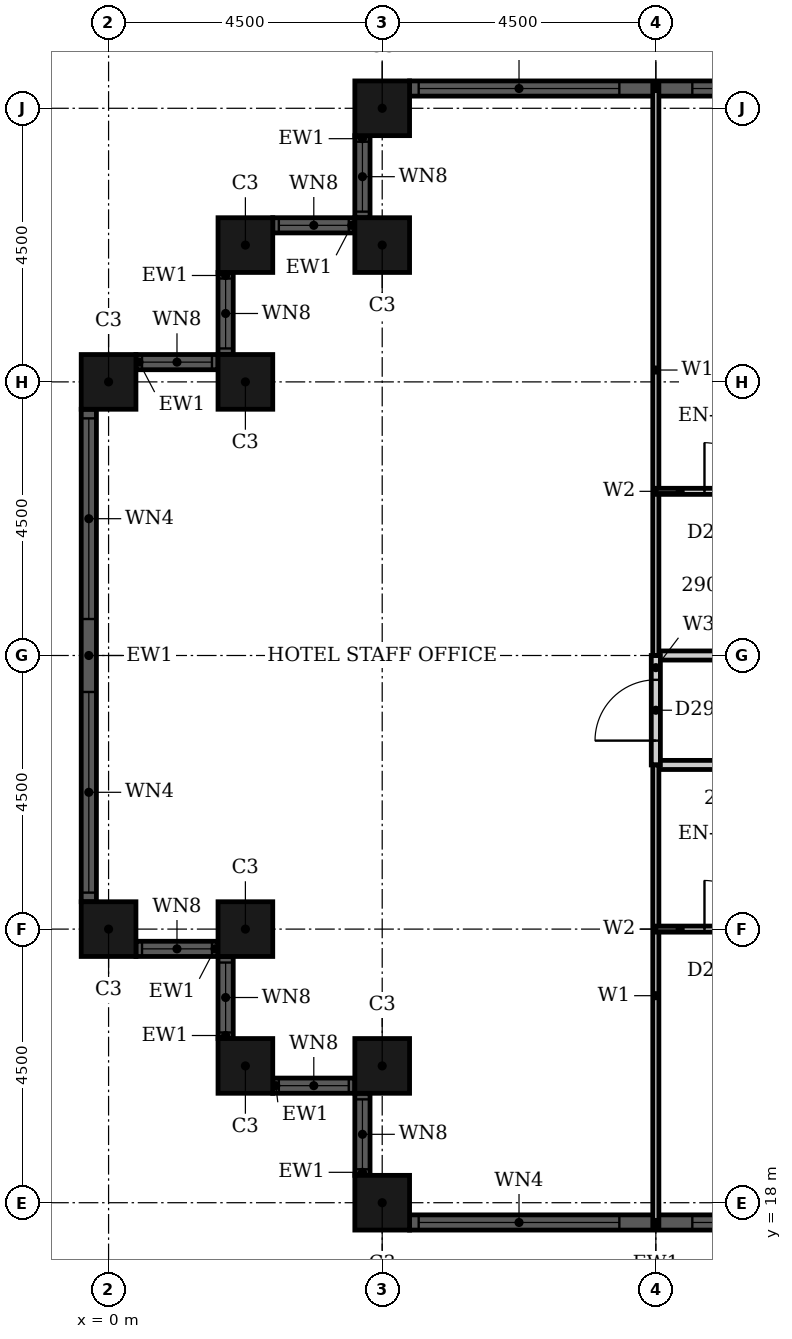
"""IFC4 building model, lengths in metres.
Left out: names, types, materials, properties, quantities, classifications, styles, units other than length and angle.
Written with IfcOpenShell. Run it as: python <this file> out.ifc"""

import sys

from ifc_helpers import new_model, si_unit, direction, frame, frame_2d, origin, origin_2d, place, context, subcontext, project, spatial, rectangle, hollow_rectangle, extrude, element, fill, save


model = new_model("IFC4")
c1 = context("Model", 3, precision=1e-05, world=origin(), true_north=direction((0.0, 1.0)))
c2 = subcontext(c1, "Body", "Model", "MODEL_VIEW")
j1 = project(units=[si_unit("LENGTHUNIT", "METRE"), si_unit("PLANEANGLEUNIT", "RADIAN")], contexts=[c1])
p1 = place(None, origin())
s1 = spatial("IfcSite", under=j1, at=p1, CompositionType="ELEMENT")
p2 = place(p1, origin())
s2 = spatial("IfcBuilding", under=s1, at=p2, CompositionType="ELEMENT")
p3 = place(p2, frame((0.0, 0.0, 118.8)))
s3 = spatial("IfcBuildingStorey", under=s2, at=p3, CompositionType="ELEMENT", Elevation=118.8)
for number, where, z_axis, x_axis in (
    (1, (4.5, 36.0, 0.0), (0.0, 0.0, 1.0), (1.0, 0.0, 0.0)),
    (2, (4.5, 33.75, 0.0), (0.0, 0.0, 1.0), (1.0, 0.0, 0.0)),
    (3, (2.25, 33.75, 0.0), (0.0, 0.0, 1.0), (1.0, 0.0, 0.0)),
    (4, (2.25, 31.5, 0.0), (0.0, 0.0, 1.0), (1.0, 0.0, 0.0)),
    (5, (0.0, 31.5, 0.0), (0.0, 0.0, 1.0), (1.0, 0.0, 0.0)),
    (6, (0.0, 22.5, 0.0), (0.0, 0.0, 1.0), (1.0, 0.0, 0.0)),
    (7, (2.25, 22.5, 0.0), (0.0, 0.0, 1.0), (1.0, 0.0, 0.0)),
    (8, (2.25, 20.25, 0.0), (0.0, 0.0, 1.0), (1.0, 0.0, 0.0)),
    (9, (4.5, 20.25, 0.0), (0.0, 0.0, 1.0), (1.0, 0.0, 0.0)),
    (10, (4.5, 18.0, 0.0), (0.0, 0.0, 1.0), (1.0, 0.0, 0.0)),
):
    element("IfcColumn", number, at=place(p3, frame(where, z_axis=z_axis, x_axis=x_axis)), inside=s3, PredefinedType="COLUMN", context=c2, shape_type="SweptSolid", body=[
        extrude(hollow_rectangle(XDim=0.9, YDim=0.9, WallThickness=0.028, at=origin_2d()), origin(), (0.0, 0.0, 1.0), 3.6),
    ])
p4 = place(p3, frame((13.05, 36.325, 0.0), z_axis=(0.0, 0.0, 1.0), x_axis=(-1.0, 0.0, 0.0)))
e11 = element("IfcWall", 11, at=p4, inside=s3, PredefinedType="SOLIDWALL", context=c2, shape_type="SweptSolid", body=[
    extrude(rectangle(XDim=8.1, YDim=0.25, at=frame_2d((4.05, 0.0))), origin(), (0.0, 0.0, 1.0), 3.6),
])
p5 = place(p4, frame((0.15, 0.0, 0.9)))
e12 = element("IfcOpeningElement", 12, at=p5, cuts=e11, PredefinedType="OPENING", context=c2, shape_type="SweptSolid", body=[
    extrude(rectangle(XDim=3.3, YDim=2.08, at=frame_2d((1.65, 1.04))), frame((0.0, 0.135, 0.0), z_axis=(0.0, -1.0, 0.0), x_axis=(1.0, 0.0, 0.0)), (0.0, 0.0, 1.0), 0.27),
])
p6 = place(p4, frame((4.65, 0.0, 0.9)))
e13 = element("IfcOpeningElement", 13, at=p6, cuts=e11, PredefinedType="OPENING", context=c2, shape_type="SweptSolid", body=[
    extrude(rectangle(XDim=3.3, YDim=2.08, at=frame_2d((1.65, 1.04))), frame((0.0, 0.135, 0.0), z_axis=(0.0, -1.0, 0.0), x_axis=(1.0, 0.0, 0.0)), (0.0, 0.0, 1.0), 0.27),
])
p7 = place(p3, frame((4.175, 35.55, 0.0), z_axis=(0.0, 0.0, 1.0), x_axis=(0.0, -1.0, 0.0)))
e14 = element("IfcWall", 14, at=p7, inside=s3, PredefinedType="SOLIDWALL", context=c2, shape_type="SweptSolid", body=[
    extrude(rectangle(XDim=1.35, YDim=0.25, at=frame_2d((0.675, 0.0))), origin(), (0.0, 0.0, 1.0), 3.6),
])
p8 = place(p7, frame((0.1, 0.0, 0.9)))
e15 = element("IfcOpeningElement", 15, at=p8, cuts=e14, PredefinedType="OPENING", context=c2, shape_type="SweptSolid", body=[
    extrude(rectangle(XDim=1.15, YDim=2.08, at=frame_2d((0.575, 1.04))), frame((0.0, 0.135, 0.0), z_axis=(0.0, -1.0, 0.0), x_axis=(1.0, 0.0, 0.0)), (0.0, 0.0, 1.0), 0.27),
])
p9 = place(p3, frame((4.05, 34.075, 0.0), z_axis=(0.0, 0.0, 1.0), x_axis=(-1.0, 0.0, 0.0)))
e16 = element("IfcWall", 16, at=p9, inside=s3, PredefinedType="SOLIDWALL", context=c2, shape_type="SweptSolid", body=[
    extrude(rectangle(XDim=1.35, YDim=0.25, at=frame_2d((0.675, 0.0))), origin(), (0.0, 0.0, 1.0), 3.6),
])
p10 = place(p9, frame((0.1, 0.0, 0.9)))
e17 = element("IfcOpeningElement", 17, at=p10, cuts=e16, PredefinedType="OPENING", context=c2, shape_type="SweptSolid", body=[
    extrude(rectangle(XDim=1.15, YDim=2.08, at=frame_2d((0.575, 1.04))), frame((0.0, 0.135, 0.0), z_axis=(0.0, -1.0, 0.0), x_axis=(1.0, 0.0, 0.0)), (0.0, 0.0, 1.0), 0.27),
])
p11 = place(p3, frame((1.925, 33.3, 0.0), z_axis=(0.0, 0.0, 1.0), x_axis=(0.0, -1.0, 0.0)))
e18 = element("IfcWall", 18, at=p11, inside=s3, PredefinedType="SOLIDWALL", context=c2, shape_type="SweptSolid", body=[
    extrude(rectangle(XDim=1.35, YDim=0.25, at=frame_2d((0.675, 0.0))), origin(), (0.0, 0.0, 1.0), 3.6),
])
p12 = place(p11, frame((0.1, 0.0, 0.9)))
e19 = element("IfcOpeningElement", 19, at=p12, cuts=e18, PredefinedType="OPENING", context=c2, shape_type="SweptSolid", body=[
    extrude(rectangle(XDim=1.15, YDim=2.08, at=frame_2d((0.575, 1.04))), frame((0.0, 0.135, 0.0), z_axis=(0.0, -1.0, 0.0), x_axis=(1.0, 0.0, 0.0)), (0.0, 0.0, 1.0), 0.27),
])
p13 = place(p3, frame((1.8, 31.825, 0.0), z_axis=(0.0, 0.0, 1.0), x_axis=(-1.0, 0.0, 0.0)))
e20 = element("IfcWall", 20, at=p13, inside=s3, PredefinedType="SOLIDWALL", context=c2, shape_type="SweptSolid", body=[
    extrude(rectangle(XDim=1.35, YDim=0.25, at=frame_2d((0.675, 0.0))), origin(), (0.0, 0.0, 1.0), 3.6),
])
p14 = place(p13, frame((0.1, 0.0, 0.9)))
e21 = element("IfcOpeningElement", 21, at=p14, cuts=e20, PredefinedType="OPENING", context=c2, shape_type="SweptSolid", body=[
    extrude(rectangle(XDim=1.15, YDim=2.08, at=frame_2d((0.575, 1.04))), frame((0.0, 0.135, 0.0), z_axis=(0.0, -1.0, 0.0), x_axis=(1.0, 0.0, 0.0)), (0.0, 0.0, 1.0), 0.27),
])
p15 = place(p3, frame((-0.325, 31.05, 0.0), z_axis=(0.0, 0.0, 1.0), x_axis=(0.0, -1.0, 0.0)))
e22 = element("IfcWall", 22, at=p15, inside=s3, PredefinedType="SOLIDWALL", context=c2, shape_type="SweptSolid", body=[
    extrude(rectangle(XDim=8.1, YDim=0.25, at=frame_2d((4.05, 0.0))), origin(), (0.0, 0.0, 1.0), 3.6),
])
p16 = place(p15, frame((0.15, 0.0, 0.9)))
e23 = element("IfcOpeningElement", 23, at=p16, cuts=e22, PredefinedType="OPENING", context=c2, shape_type="SweptSolid", body=[
    extrude(rectangle(XDim=3.3, YDim=2.08, at=frame_2d((1.65, 1.04))), frame((0.0, 0.135, 0.0), z_axis=(0.0, -1.0, 0.0), x_axis=(1.0, 0.0, 0.0)), (0.0, 0.0, 1.0), 0.27),
])
p17 = place(p15, frame((4.65, 0.0, 0.9)))
e24 = element("IfcOpeningElement", 24, at=p17, cuts=e22, PredefinedType="OPENING", context=c2, shape_type="SweptSolid", body=[
    extrude(rectangle(XDim=3.3, YDim=2.08, at=frame_2d((1.65, 1.04))), frame((0.0, 0.135, 0.0), z_axis=(0.0, -1.0, 0.0), x_axis=(1.0, 0.0, 0.0)), (0.0, 0.0, 1.0), 0.27),
])
p18 = place(p3, frame((0.45, 22.175, 0.0), z_axis=(0.0, 0.0, 1.0), x_axis=(1.0, 0.0, 0.0)))
e25 = element("IfcWall", 25, at=p18, inside=s3, PredefinedType="SOLIDWALL", context=c2, shape_type="SweptSolid", body=[
    extrude(rectangle(XDim=1.35, YDim=0.25, at=frame_2d((0.675, 0.0))), origin(), (0.0, 0.0, 1.0), 3.6),
])
p19 = place(p18, frame((0.1, 0.0, 0.9)))
e26 = element("IfcOpeningElement", 26, at=p19, cuts=e25, PredefinedType="OPENING", context=c2, shape_type="SweptSolid", body=[
    extrude(rectangle(XDim=1.15, YDim=2.08, at=frame_2d((0.575, 1.04))), frame((0.0, 0.135, 0.0), z_axis=(0.0, -1.0, 0.0), x_axis=(1.0, 0.0, 0.0)), (0.0, 0.0, 1.0), 0.27),
])
p20 = place(p3, frame((1.925, 22.05, 0.0), z_axis=(0.0, 0.0, 1.0), x_axis=(0.0, -1.0, 0.0)))
e27 = element("IfcWall", 27, at=p20, inside=s3, PredefinedType="SOLIDWALL", context=c2, shape_type="SweptSolid", body=[
    extrude(rectangle(XDim=1.35, YDim=0.25, at=frame_2d((0.675, 0.0))), origin(), (0.0, 0.0, 1.0), 3.6),
])
p21 = place(p20, frame((0.1, 0.0, 0.9)))
e28 = element("IfcOpeningElement", 28, at=p21, cuts=e27, PredefinedType="OPENING", context=c2, shape_type="SweptSolid", body=[
    extrude(rectangle(XDim=1.15, YDim=2.08, at=frame_2d((0.575, 1.04))), frame((0.0, 0.135, 0.0), z_axis=(0.0, -1.0, 0.0), x_axis=(1.0, 0.0, 0.0)), (0.0, 0.0, 1.0), 0.27),
])
p22 = place(p3, frame((2.7, 19.925, 0.0), z_axis=(0.0, 0.0, 1.0), x_axis=(1.0, 0.0, 0.0)))
e29 = element("IfcWall", 29, at=p22, inside=s3, PredefinedType="SOLIDWALL", context=c2, shape_type="SweptSolid", body=[
    extrude(rectangle(XDim=1.35, YDim=0.25, at=frame_2d((0.675, 0.0))), origin(), (0.0, 0.0, 1.0), 3.6),
])
p23 = place(p22, frame((0.1, 0.0, 0.9)))
e30 = element("IfcOpeningElement", 30, at=p23, cuts=e29, PredefinedType="OPENING", context=c2, shape_type="SweptSolid", body=[
    extrude(rectangle(XDim=1.15, YDim=2.08, at=frame_2d((0.575, 1.04))), frame((0.0, 0.135, 0.0), z_axis=(0.0, -1.0, 0.0), x_axis=(1.0, 0.0, 0.0)), (0.0, 0.0, 1.0), 0.27),
])
p24 = place(p3, frame((4.175, 19.8, 0.0), z_axis=(0.0, 0.0, 1.0), x_axis=(0.0, -1.0, 0.0)))
e31 = element("IfcWall", 31, at=p24, inside=s3, PredefinedType="SOLIDWALL", context=c2, shape_type="SweptSolid", body=[
    extrude(rectangle(XDim=1.35, YDim=0.25, at=frame_2d((0.675, 0.0))), origin(), (0.0, 0.0, 1.0), 3.6),
])
p25 = place(p24, frame((0.1, 0.0, 0.9)))
e32 = element("IfcOpeningElement", 32, at=p25, cuts=e31, PredefinedType="OPENING", context=c2, shape_type="SweptSolid", body=[
    extrude(rectangle(XDim=1.15, YDim=2.08, at=frame_2d((0.575, 1.04))), frame((0.0, 0.135, 0.0), z_axis=(0.0, -1.0, 0.0), x_axis=(1.0, 0.0, 0.0)), (0.0, 0.0, 1.0), 0.27),
])
p26 = place(p3, frame((4.95, 17.675, 0.0), z_axis=(0.0, 0.0, 1.0), x_axis=(1.0, 0.0, 0.0)))
e33 = element("IfcWall", 33, at=p26, inside=s3, PredefinedType="SOLIDWALL", context=c2, shape_type="SweptSolid", body=[
    extrude(rectangle(XDim=8.1, YDim=0.25, at=frame_2d((4.05, 0.0))), origin(), (0.0, 0.0, 1.0), 3.6),
])
p27 = place(p26, frame((0.15, 0.0, 0.9)))
e34 = element("IfcOpeningElement", 34, at=p27, cuts=e33, PredefinedType="OPENING", context=c2, shape_type="SweptSolid", body=[
    extrude(rectangle(XDim=3.3, YDim=2.08, at=frame_2d((1.65, 1.04))), frame((0.0, 0.135, 0.0), z_axis=(0.0, -1.0, 0.0), x_axis=(1.0, 0.0, 0.0)), (0.0, 0.0, 1.0), 0.27),
])
p28 = place(p26, frame((4.65, 0.0, 0.9)))
e35 = element("IfcOpeningElement", 35, at=p28, cuts=e33, PredefinedType="OPENING", context=c2, shape_type="SweptSolid", body=[
    extrude(rectangle(XDim=3.3, YDim=2.08, at=frame_2d((1.65, 1.04))), frame((0.0, 0.135, 0.0), z_axis=(0.0, -1.0, 0.0), x_axis=(1.0, 0.0, 0.0)), (0.0, 0.0, 1.0), 0.27),
])
p29 = place(p3, frame((9.0, 25.2, 0.0), z_axis=(0.0, 0.0, 1.0), x_axis=(1.0, 0.0, 0.0)))
e36 = element("IfcWall", 36, at=p29, inside=s3, PredefinedType="PARTITIONING", context=c2, shape_type="SweptSolid", body=[
    extrude(rectangle(XDim=7.2, YDim=0.15, at=frame_2d((3.6, 0.0))), origin(), (0.0, 0.0, 1.0), 3.3),
])
p30 = place(p29, frame((2.95, 0.0, 0.0)))
e37 = element("IfcOpeningElement", 37, at=p30, cuts=e36, PredefinedType="OPENING", context=c2, shape_type="SweptSolid", body=[
    extrude(rectangle(XDim=1.0, YDim=2.1, at=frame_2d((0.5, 1.05))), frame((0.0, 0.085, 0.0), z_axis=(0.0, -1.0, 0.0), x_axis=(1.0, 0.0, 0.0)), (0.0, 0.0, 1.0), 0.17),
])
p31 = place(p3, frame((9.0, 27.0, 0.0), z_axis=(0.0, 0.0, 1.0), x_axis=(1.0, 0.0, 0.0)))
e38 = element("IfcWall", 38, at=p31, inside=s3, PredefinedType="PARTITIONING", context=c2, shape_type="SweptSolid", body=[
    extrude(rectangle(XDim=7.2, YDim=0.15, at=frame_2d((3.6, 0.0))), origin(), (0.0, 0.0, 1.0), 2.58),
])
p32 = place(p31, frame((2.95, 0.0, 0.0)))
e39 = element("IfcOpeningElement", 39, at=p32, cuts=e38, PredefinedType="OPENING", context=c2, shape_type="SweptSolid", body=[
    extrude(rectangle(XDim=1.0, YDim=2.1, at=frame_2d((0.5, 1.05))), frame((0.0, 0.085, 0.0), z_axis=(0.0, -1.0, 0.0), x_axis=(1.0, 0.0, 0.0)), (0.0, 0.0, 1.0), 0.17),
])
p33 = place(p3, frame((9.0, 25.2, 0.0), z_axis=(0.0, 0.0, 1.0), x_axis=(0.0, 1.0, 0.0)))
e40 = element("IfcWall", 40, at=p33, inside=s3, PredefinedType="PARTITIONING", context=c2, shape_type="SweptSolid", body=[
    extrude(rectangle(XDim=1.8, YDim=0.15, at=frame_2d((0.9, 0.0))), origin(), (0.0, 0.0, 1.0), 3.3),
])
p34 = place(p33, frame((0.4, 0.0, 0.0)))
e41 = element("IfcOpeningElement", 41, at=p34, cuts=e40, PredefinedType="OPENING", context=c2, shape_type="SweptSolid", body=[
    extrude(rectangle(XDim=1.0, YDim=2.1, at=frame_2d((0.5, 1.05))), frame((0.0, 0.085, 0.0), z_axis=(0.0, -1.0, 0.0), x_axis=(1.0, 0.0, 0.0)), (0.0, 0.0, 1.0), 0.17),
])
p35 = place(p3, frame((9.0, 27.0, 0.0), z_axis=(0.0, 0.0, 1.0), x_axis=(0.0, 1.0, 0.0)))
e42 = element("IfcWall", 42, at=p35, inside=s3, PredefinedType="PARTITIONING", context=c2, shape_type="SweptSolid", body=[
    extrude(rectangle(XDim=9.39, YDim=0.1, at=frame_2d((4.695, 0.0))), origin(), (0.0, 0.0, 1.0), 3.3),
])
p36 = place(p3, frame((9.0, 17.61, 0.0), z_axis=(0.0, 0.0, 1.0), x_axis=(0.0, 1.0, 0.0)))
e43 = element("IfcWall", 43, at=p36, inside=s3, PredefinedType="PARTITIONING", context=c2, shape_type="SweptSolid", body=[
    extrude(rectangle(XDim=7.59, YDim=0.1, at=frame_2d((3.795, 0.0))), origin(), (0.0, 0.0, 1.0), 3.3),
])
p37 = place(p3, frame((9.0, 22.5, 0.0), z_axis=(0.0, 0.0, 1.0), x_axis=(1.0, 0.0, 0.0)))
e44 = element("IfcWall", 44, at=p37, inside=s3, PredefinedType="PARTITIONING", context=c2, shape_type="SweptSolid", body=[
    extrude(rectangle(XDim=2.4, YDim=0.1, at=frame_2d((1.2, 0.0))), origin(), (0.0, 0.0, 1.0), 2.58),
])
p38 = place(p37, frame((0.8, 0.0, 0.0)))
e45 = element("IfcOpeningElement", 45, at=p38, cuts=e44, PredefinedType="OPENING", context=c2, shape_type="SweptSolid", body=[
    extrude(rectangle(XDim=0.8, YDim=2.1, at=frame_2d((0.4, 1.05))), frame((0.0, 0.06, 0.0), z_axis=(0.0, -1.0, 0.0), x_axis=(1.0, 0.0, 0.0)), (0.0, 0.0, 1.0), 0.12),
])
p39 = place(p3, frame((9.0, 29.7, 0.0), z_axis=(0.0, 0.0, 1.0), x_axis=(1.0, 0.0, 0.0)))
e46 = element("IfcWall", 46, at=p39, inside=s3, PredefinedType="PARTITIONING", context=c2, shape_type="SweptSolid", body=[
    extrude(rectangle(XDim=2.4, YDim=0.1, at=frame_2d((1.2, 0.0))), origin(), (0.0, 0.0, 1.0), 3.3),
])
p40 = place(p39, frame((0.8, 0.0, 0.0)))
e47 = element("IfcOpeningElement", 47, at=p40, cuts=e46, PredefinedType="OPENING", context=c2, shape_type="SweptSolid", body=[
    extrude(rectangle(XDim=0.8, YDim=2.1, at=frame_2d((0.4, 1.05))), frame((0.0, 0.06, 0.0), z_axis=(0.0, -1.0, 0.0), x_axis=(1.0, 0.0, 0.0)), (0.0, 0.0, 1.0), 0.12),
])
p41 = place(p5, origin())
e48 = element("IfcWindow", 48, at=p41, inside=s3, PartitioningType="SINGLE_PANEL", PredefinedType="WINDOW", context=c2, shape_type="SweptSolid", body=[
    extrude(rectangle(XDim=3.3, YDim=2.08, at=frame_2d((1.65, 1.04))), frame((0.0, 0.03, 0.0), z_axis=(0.0, -1.0, 0.0), x_axis=(1.0, 0.0, 0.0)), (0.0, 0.0, 1.0), 0.06),
])
fill(e12, e48)
p42 = place(p6, origin())
e49 = element("IfcWindow", 49, at=p42, inside=s3, PartitioningType="SINGLE_PANEL", PredefinedType="WINDOW", context=c2, shape_type="SweptSolid", body=[
    extrude(rectangle(XDim=3.3, YDim=2.08, at=frame_2d((1.65, 1.04))), frame((0.0, 0.03, 0.0), z_axis=(0.0, -1.0, 0.0), x_axis=(1.0, 0.0, 0.0)), (0.0, 0.0, 1.0), 0.06),
])
fill(e13, e49)
p43 = place(p8, origin())
e50 = element("IfcWindow", 50, at=p43, inside=s3, PartitioningType="SINGLE_PANEL", PredefinedType="WINDOW", context=c2, shape_type="SweptSolid", body=[
    extrude(rectangle(XDim=1.15, YDim=2.08, at=frame_2d((0.575, 1.04))), frame((0.0, 0.03, 0.0), z_axis=(0.0, -1.0, 0.0), x_axis=(1.0, 0.0, 0.0)), (0.0, 0.0, 1.0), 0.06),
])
fill(e15, e50)
p44 = place(p10, origin())
e51 = element("IfcWindow", 51, at=p44, inside=s3, PartitioningType="SINGLE_PANEL", PredefinedType="WINDOW", context=c2, shape_type="SweptSolid", body=[
    extrude(rectangle(XDim=1.15, YDim=2.08, at=frame_2d((0.575, 1.04))), frame((0.0, 0.03, 0.0), z_axis=(0.0, -1.0, 0.0), x_axis=(1.0, 0.0, 0.0)), (0.0, 0.0, 1.0), 0.06),
])
fill(e17, e51)
p45 = place(p12, origin())
e52 = element("IfcWindow", 52, at=p45, inside=s3, PartitioningType="SINGLE_PANEL", PredefinedType="WINDOW", context=c2, shape_type="SweptSolid", body=[
    extrude(rectangle(XDim=1.15, YDim=2.08, at=frame_2d((0.575, 1.04))), frame((0.0, 0.03, 0.0), z_axis=(0.0, -1.0, 0.0), x_axis=(1.0, 0.0, 0.0)), (0.0, 0.0, 1.0), 0.06),
])
fill(e19, e52)
p46 = place(p14, origin())
e53 = element("IfcWindow", 53, at=p46, inside=s3, PartitioningType="SINGLE_PANEL", PredefinedType="WINDOW", context=c2, shape_type="SweptSolid", body=[
    extrude(rectangle(XDim=1.15, YDim=2.08, at=frame_2d((0.575, 1.04))), frame((0.0, 0.03, 0.0), z_axis=(0.0, -1.0, 0.0), x_axis=(1.0, 0.0, 0.0)), (0.0, 0.0, 1.0), 0.06),
])
fill(e21, e53)
p47 = place(p16, origin())
e54 = element("IfcWindow", 54, at=p47, inside=s3, PartitioningType="SINGLE_PANEL", PredefinedType="WINDOW", context=c2, shape_type="SweptSolid", body=[
    extrude(rectangle(XDim=3.3, YDim=2.08, at=frame_2d((1.65, 1.04))), frame((0.0, 0.03, 0.0), z_axis=(0.0, -1.0, 0.0), x_axis=(1.0, 0.0, 0.0)), (0.0, 0.0, 1.0), 0.06),
])
fill(e23, e54)
p48 = place(p17, origin())
e55 = element("IfcWindow", 55, at=p48, inside=s3, PartitioningType="SINGLE_PANEL", PredefinedType="WINDOW", context=c2, shape_type="SweptSolid", body=[
    extrude(rectangle(XDim=3.3, YDim=2.08, at=frame_2d((1.65, 1.04))), frame((0.0, 0.03, 0.0), z_axis=(0.0, -1.0, 0.0), x_axis=(1.0, 0.0, 0.0)), (0.0, 0.0, 1.0), 0.06),
])
fill(e24, e55)
p49 = place(p19, origin())
e56 = element("IfcWindow", 56, at=p49, inside=s3, PartitioningType="SINGLE_PANEL", PredefinedType="WINDOW", context=c2, shape_type="SweptSolid", body=[
    extrude(rectangle(XDim=1.15, YDim=2.08, at=frame_2d((0.575, 1.04))), frame((0.0, 0.03, 0.0), z_axis=(0.0, -1.0, 0.0), x_axis=(1.0, 0.0, 0.0)), (0.0, 0.0, 1.0), 0.06),
])
fill(e26, e56)
p50 = place(p21, origin())
e57 = element("IfcWindow", 57, at=p50, inside=s3, PartitioningType="SINGLE_PANEL", PredefinedType="WINDOW", context=c2, shape_type="SweptSolid", body=[
    extrude(rectangle(XDim=1.15, YDim=2.08, at=frame_2d((0.575, 1.04))), frame((0.0, 0.03, 0.0), z_axis=(0.0, -1.0, 0.0), x_axis=(1.0, 0.0, 0.0)), (0.0, 0.0, 1.0), 0.06),
])
fill(e28, e57)
p51 = place(p23, origin())
e58 = element("IfcWindow", 58, at=p51, inside=s3, PartitioningType="SINGLE_PANEL", PredefinedType="WINDOW", context=c2, shape_type="SweptSolid", body=[
    extrude(rectangle(XDim=1.15, YDim=2.08, at=frame_2d((0.575, 1.04))), frame((0.0, 0.03, 0.0), z_axis=(0.0, -1.0, 0.0), x_axis=(1.0, 0.0, 0.0)), (0.0, 0.0, 1.0), 0.06),
])
fill(e30, e58)
p52 = place(p25, origin())
e59 = element("IfcWindow", 59, at=p52, inside=s3, PartitioningType="SINGLE_PANEL", PredefinedType="WINDOW", context=c2, shape_type="SweptSolid", body=[
    extrude(rectangle(XDim=1.15, YDim=2.08, at=frame_2d((0.575, 1.04))), frame((0.0, 0.03, 0.0), z_axis=(0.0, -1.0, 0.0), x_axis=(1.0, 0.0, 0.0)), (0.0, 0.0, 1.0), 0.06),
])
fill(e32, e59)
p53 = place(p27, origin())
e60 = element("IfcWindow", 60, at=p53, inside=s3, PartitioningType="SINGLE_PANEL", PredefinedType="WINDOW", context=c2, shape_type="SweptSolid", body=[
    extrude(rectangle(XDim=3.3, YDim=2.08, at=frame_2d((1.65, 1.04))), frame((0.0, 0.03, 0.0), z_axis=(0.0, -1.0, 0.0), x_axis=(1.0, 0.0, 0.0)), (0.0, 0.0, 1.0), 0.06),
])
fill(e34, e60)
p54 = place(p28, origin())
e61 = element("IfcWindow", 61, at=p54, inside=s3, PartitioningType="SINGLE_PANEL", PredefinedType="WINDOW", context=c2, shape_type="SweptSolid", body=[
    extrude(rectangle(XDim=3.3, YDim=2.08, at=frame_2d((1.65, 1.04))), frame((0.0, 0.03, 0.0), z_axis=(0.0, -1.0, 0.0), x_axis=(1.0, 0.0, 0.0)), (0.0, 0.0, 1.0), 0.06),
])
fill(e35, e61)
p55 = place(p38, origin())
e62 = element("IfcDoor", 62, at=p55, inside=s3, OperationType="SINGLE_SWING_RIGHT", PredefinedType="DOOR", context=c2, shape_type="SweptSolid", body=[
    extrude(rectangle(XDim=0.8, YDim=2.1, at=frame_2d((0.4, 1.05))), frame((0.0, 0.025, 0.0), z_axis=(0.0, -1.0, 0.0), x_axis=(1.0, 0.0, 0.0)), (0.0, 0.0, 1.0), 0.05),
])
fill(e45, e62)
p56 = place(p40, origin())
e63 = element("IfcDoor", 63, at=p56, inside=s3, OperationType="SINGLE_SWING_LEFT", PredefinedType="DOOR", context=c2, shape_type="SweptSolid", body=[
    extrude(rectangle(XDim=0.8, YDim=2.1, at=frame_2d((0.4, 1.05))), frame((0.0, 0.025, 0.0), z_axis=(0.0, -1.0, 0.0), x_axis=(1.0, 0.0, 0.0)), (0.0, 0.0, 1.0), 0.05),
])
fill(e47, e63)
p57 = place(p34, origin())
e64 = element("IfcDoor", 64, at=p57, inside=s3, OperationType="SINGLE_SWING_RIGHT", PredefinedType="DOOR", context=c2, shape_type="SweptSolid", body=[
    extrude(rectangle(XDim=1.0, YDim=2.1, at=frame_2d((0.5, 1.05))), frame((0.0, 0.025, 0.0), z_axis=(0.0, -1.0, 0.0), x_axis=(1.0, 0.0, 0.0)), (0.0, 0.0, 1.0), 0.05),
])
fill(e41, e64)
save(model, sys.argv[1])
